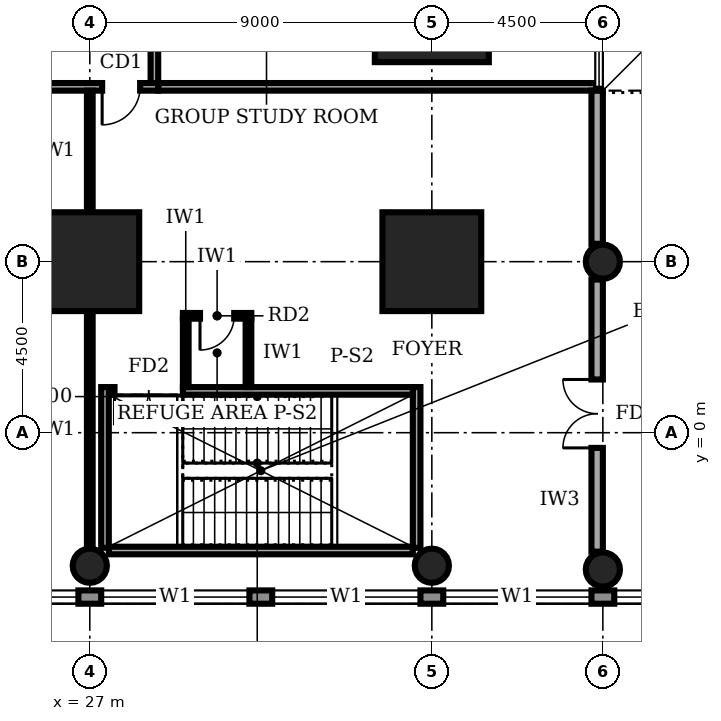
"""IFC4 building model, lengths in metres.
Left out: names, types, materials, properties, quantities, classifications, styles, units other than length and angle.
Written with IfcOpenShell. Run it as: python <this file> out.ifc"""

import sys

from ifc_helpers import new_model, si_unit, direction, frame, frame_2d, origin, origin_2d, place, context, subcontext, project, spatial, rectangle, circle, extrude, element, fill, save


model = new_model("IFC4")
c1 = context("Model", 3, precision=1e-05, world=origin(), true_north=direction((0.0, 1.0)))
c2 = subcontext(c1, "Body", "Model", "MODEL_VIEW")
j1 = project(units=[si_unit("LENGTHUNIT", "METRE"), si_unit("PLANEANGLEUNIT", "RADIAN")], contexts=[c1])
p1 = place(None, origin())
s1 = spatial("IfcSite", under=j1, at=p1, CompositionType="ELEMENT")
p2 = place(p1, origin())
s2 = spatial("IfcBuilding", under=s1, at=p2, CompositionType="ELEMENT")
p3 = place(p2, frame((0.0, 0.0, 11.0)))
s3 = spatial("IfcBuildingStorey", under=s2, at=p3, CompositionType="ELEMENT", Elevation=11.0)
for number, where, z_axis, x_axis in (
    (1, (27.0, 4.5, 0.0), (0.0, 0.0, 1.0), (1.0, 0.0, 0.0)),
    (2, (36.0, 4.5, 0.0), (0.0, 0.0, 1.0), (1.0, 0.0, 0.0)),
):
    element("IfcColumn", number, at=place(p3, frame(where, z_axis=z_axis, x_axis=x_axis)), inside=s3, PredefinedType="COLUMN", context=c2, shape_type="SweptSolid", body=[
        extrude(rectangle(XDim=2.6, YDim=2.6, at=origin_2d()), origin(), (0.0, 0.0, 1.0), 5.0),
    ])
p4 = place(p3, frame((36.0, 11.25, 0.0), z_axis=(0.0, 0.0, 1.0), x_axis=(1.0, 0.0, 0.0)))
e3 = element("IfcColumn", 3, at=p4, inside=s3, PredefinedType="COLUMN", context=c2, shape_type="SweptSolid", body=[
    extrude(rectangle(XDim=3.0, YDim=3.0, at=origin_2d()), origin(), (0.0, 0.0, 1.0), 5.0),
])
for number, where, z_axis, x_axis in (
    (4, (27.0, -3.5, 0.0), (0.0, 0.0, 1.0), (1.0, 0.0, 0.0)),
    (5, (36.0, -3.5, 0.0), (0.0, 0.0, 1.0), (1.0, 0.0, 0.0)),
    (6, (40.5, -3.6, 0.0), (0.0, 0.0, 1.0), (1.0, 0.0, 0.0)),
    (7, (40.5, 4.5, 0.0), (0.0, 0.0, 1.0), (1.0, 0.0, 0.0)),
):
    element("IfcColumn", number, at=place(p3, frame(where, z_axis=z_axis, x_axis=x_axis)), inside=s3, PredefinedType="COLUMN", context=c2, shape_type="SweptSolid", body=[
        extrude(circle(Radius=0.45, at=origin_2d()), origin(), (0.0, 0.0, 1.0), 5.0),
    ])
p5 = place(p3, frame((0.02, -4.325, 0.0), z_axis=(0.0, 0.0, 1.0), x_axis=(1.0, 0.0, 0.0)))
e8 = element("IfcWall", 8, at=p5, inside=s3, PredefinedType="STANDARD", context=c2, shape_type="SweptSolid", body=[
    extrude(rectangle(XDim=98.96, YDim=0.35, at=frame_2d((49.48, 0.0))), origin(), (0.0, 0.0, 1.0), 4.7),
])
p6 = place(p5, frame((4.78, 0.0, 0.9)))
e9 = element("IfcOpeningElement", 9, at=p6, cuts=e8, PredefinedType="OPENING", context=c2, shape_type="SweptSolid", body=[
    extrude(rectangle(XDim=3.9, YDim=2.2, at=frame_2d((1.95, 1.1))), frame((0.0, 0.185, 0.0), z_axis=(0.0, -1.0, 0.0), x_axis=(1.0, 0.0, 0.0)), (0.0, 0.0, 1.0), 0.37),
])
p7 = place(p5, frame((9.28, 0.0, 0.9)))
e10 = element("IfcOpeningElement", 10, at=p7, cuts=e8, PredefinedType="OPENING", context=c2, shape_type="SweptSolid", body=[
    extrude(rectangle(XDim=3.9, YDim=2.2, at=frame_2d((1.95, 1.1))), frame((0.0, 0.185, 0.0), z_axis=(0.0, -1.0, 0.0), x_axis=(1.0, 0.0, 0.0)), (0.0, 0.0, 1.0), 0.37),
])
p8 = place(p5, frame((13.78, 0.0, 0.9)))
e11 = element("IfcOpeningElement", 11, at=p8, cuts=e8, PredefinedType="OPENING", context=c2, shape_type="SweptSolid", body=[
    extrude(rectangle(XDim=3.9, YDim=2.2, at=frame_2d((1.95, 1.1))), frame((0.0, 0.185, 0.0), z_axis=(0.0, -1.0, 0.0), x_axis=(1.0, 0.0, 0.0)), (0.0, 0.0, 1.0), 0.37),
])
p9 = place(p5, frame((18.28, 0.0, 0.9)))
e12 = element("IfcOpeningElement", 12, at=p9, cuts=e8, PredefinedType="OPENING", context=c2, shape_type="SweptSolid", body=[
    extrude(rectangle(XDim=3.9, YDim=2.2, at=frame_2d((1.95, 1.1))), frame((0.0, 0.185, 0.0), z_axis=(0.0, -1.0, 0.0), x_axis=(1.0, 0.0, 0.0)), (0.0, 0.0, 1.0), 0.37),
])
p10 = place(p5, frame((22.78, 0.0, 0.9)))
e13 = element("IfcOpeningElement", 13, at=p10, cuts=e8, PredefinedType="OPENING", context=c2, shape_type="SweptSolid", body=[
    extrude(rectangle(XDim=3.9, YDim=2.2, at=frame_2d((1.95, 1.1))), frame((0.0, 0.185, 0.0), z_axis=(0.0, -1.0, 0.0), x_axis=(1.0, 0.0, 0.0)), (0.0, 0.0, 1.0), 0.37),
])
p11 = place(p5, frame((27.28, 0.0, 0.9)))
e14 = element("IfcOpeningElement", 14, at=p11, cuts=e8, PredefinedType="OPENING", context=c2, shape_type="SweptSolid", body=[
    extrude(rectangle(XDim=3.9, YDim=2.2, at=frame_2d((1.95, 1.1))), frame((0.0, 0.185, 0.0), z_axis=(0.0, -1.0, 0.0), x_axis=(1.0, 0.0, 0.0)), (0.0, 0.0, 1.0), 0.37),
])
p12 = place(p5, frame((31.78, 0.0, 0.9)))
e15 = element("IfcOpeningElement", 15, at=p12, cuts=e8, PredefinedType="OPENING", context=c2, shape_type="SweptSolid", body=[
    extrude(rectangle(XDim=3.9, YDim=2.2, at=frame_2d((1.95, 1.1))), frame((0.0, 0.185, 0.0), z_axis=(0.0, -1.0, 0.0), x_axis=(1.0, 0.0, 0.0)), (0.0, 0.0, 1.0), 0.37),
])
p13 = place(p5, frame((36.28, 0.0, 0.9)))
e16 = element("IfcOpeningElement", 16, at=p13, cuts=e8, PredefinedType="OPENING", context=c2, shape_type="SweptSolid", body=[
    extrude(rectangle(XDim=3.9, YDim=2.2, at=frame_2d((1.95, 1.1))), frame((0.0, 0.185, 0.0), z_axis=(0.0, -1.0, 0.0), x_axis=(1.0, 0.0, 0.0)), (0.0, 0.0, 1.0), 0.37),
])
p14 = place(p5, frame((40.78, 0.0, 0.9)))
e17 = element("IfcOpeningElement", 17, at=p14, cuts=e8, PredefinedType="OPENING", context=c2, shape_type="SweptSolid", body=[
    extrude(rectangle(XDim=3.9, YDim=2.2, at=frame_2d((1.95, 1.1))), frame((0.0, 0.185, 0.0), z_axis=(0.0, -1.0, 0.0), x_axis=(1.0, 0.0, 0.0)), (0.0, 0.0, 1.0), 0.37),
])
p15 = place(p5, frame((45.28, 0.0, 0.9)))
e18 = element("IfcOpeningElement", 18, at=p15, cuts=e8, PredefinedType="OPENING", context=c2, shape_type="SweptSolid", body=[
    extrude(rectangle(XDim=3.9, YDim=2.2, at=frame_2d((1.95, 1.1))), frame((0.0, 0.185, 0.0), z_axis=(0.0, -1.0, 0.0), x_axis=(1.0, 0.0, 0.0)), (0.0, 0.0, 1.0), 0.37),
])
p16 = place(p5, frame((49.78, 0.0, 0.9)))
e19 = element("IfcOpeningElement", 19, at=p16, cuts=e8, PredefinedType="OPENING", context=c2, shape_type="SweptSolid", body=[
    extrude(rectangle(XDim=3.9, YDim=2.2, at=frame_2d((1.95, 1.1))), frame((0.0, 0.185, 0.0), z_axis=(0.0, -1.0, 0.0), x_axis=(1.0, 0.0, 0.0)), (0.0, 0.0, 1.0), 0.37),
])
p17 = place(p5, frame((54.28, 0.0, 0.9)))
e20 = element("IfcOpeningElement", 20, at=p17, cuts=e8, PredefinedType="OPENING", context=c2, shape_type="SweptSolid", body=[
    extrude(rectangle(XDim=3.9, YDim=2.2, at=frame_2d((1.95, 1.1))), frame((0.0, 0.185, 0.0), z_axis=(0.0, -1.0, 0.0), x_axis=(1.0, 0.0, 0.0)), (0.0, 0.0, 1.0), 0.37),
])
p18 = place(p5, frame((58.78, 0.0, 0.9)))
e21 = element("IfcOpeningElement", 21, at=p18, cuts=e8, PredefinedType="OPENING", context=c2, shape_type="SweptSolid", body=[
    extrude(rectangle(XDim=3.9, YDim=2.2, at=frame_2d((1.95, 1.1))), frame((0.0, 0.185, 0.0), z_axis=(0.0, -1.0, 0.0), x_axis=(1.0, 0.0, 0.0)), (0.0, 0.0, 1.0), 0.37),
])
p19 = place(p5, frame((63.28, 0.0, 0.9)))
e22 = element("IfcOpeningElement", 22, at=p19, cuts=e8, PredefinedType="OPENING", context=c2, shape_type="SweptSolid", body=[
    extrude(rectangle(XDim=3.9, YDim=2.2, at=frame_2d((1.95, 1.1))), frame((0.0, 0.185, 0.0), z_axis=(0.0, -1.0, 0.0), x_axis=(1.0, 0.0, 0.0)), (0.0, 0.0, 1.0), 0.37),
])
p20 = place(p5, frame((67.78, 0.0, 0.9)))
e23 = element("IfcOpeningElement", 23, at=p20, cuts=e8, PredefinedType="OPENING", context=c2, shape_type="SweptSolid", body=[
    extrude(rectangle(XDim=3.9, YDim=2.2, at=frame_2d((1.95, 1.1))), frame((0.0, 0.185, 0.0), z_axis=(0.0, -1.0, 0.0), x_axis=(1.0, 0.0, 0.0)), (0.0, 0.0, 1.0), 0.37),
])
p21 = place(p5, frame((72.28, 0.0, 0.9)))
e24 = element("IfcOpeningElement", 24, at=p21, cuts=e8, PredefinedType="OPENING", context=c2, shape_type="SweptSolid", body=[
    extrude(rectangle(XDim=3.9, YDim=2.2, at=frame_2d((1.95, 1.1))), frame((0.0, 0.185, 0.0), z_axis=(0.0, -1.0, 0.0), x_axis=(1.0, 0.0, 0.0)), (0.0, 0.0, 1.0), 0.37),
])
p22 = place(p5, frame((76.78, 0.0, 0.9)))
e25 = element("IfcOpeningElement", 25, at=p22, cuts=e8, PredefinedType="OPENING", context=c2, shape_type="SweptSolid", body=[
    extrude(rectangle(XDim=3.9, YDim=2.2, at=frame_2d((1.95, 1.1))), frame((0.0, 0.185, 0.0), z_axis=(0.0, -1.0, 0.0), x_axis=(1.0, 0.0, 0.0)), (0.0, 0.0, 1.0), 0.37),
])
p23 = place(p5, frame((81.28, 0.0, 0.9)))
e26 = element("IfcOpeningElement", 26, at=p23, cuts=e8, PredefinedType="OPENING", context=c2, shape_type="SweptSolid", body=[
    extrude(rectangle(XDim=3.9, YDim=2.2, at=frame_2d((1.95, 1.1))), frame((0.0, 0.185, 0.0), z_axis=(0.0, -1.0, 0.0), x_axis=(1.0, 0.0, 0.0)), (0.0, 0.0, 1.0), 0.37),
])
p24 = place(p5, frame((85.78, 0.0, 0.9)))
e27 = element("IfcOpeningElement", 27, at=p24, cuts=e8, PredefinedType="OPENING", context=c2, shape_type="SweptSolid", body=[
    extrude(rectangle(XDim=3.9, YDim=2.2, at=frame_2d((1.95, 1.1))), frame((0.0, 0.185, 0.0), z_axis=(0.0, -1.0, 0.0), x_axis=(1.0, 0.0, 0.0)), (0.0, 0.0, 1.0), 0.37),
])
p25 = place(p5, frame((90.28, 0.0, 0.9)))
e28 = element("IfcOpeningElement", 28, at=p25, cuts=e8, PredefinedType="OPENING", context=c2, shape_type="SweptSolid", body=[
    extrude(rectangle(XDim=3.9, YDim=2.2, at=frame_2d((1.95, 1.1))), frame((0.0, 0.185, 0.0), z_axis=(0.0, -1.0, 0.0), x_axis=(1.0, 0.0, 0.0)), (0.0, 0.0, 1.0), 0.37),
])
p26 = place(p5, frame((94.71, 0.0, 0.9)))
e29 = element("IfcOpeningElement", 29, at=p26, cuts=e8, PredefinedType="OPENING", context=c2, shape_type="SweptSolid", body=[
    extrude(rectangle(XDim=3.9, YDim=2.2, at=frame_2d((1.95, 1.1))), frame((0.0, 0.185, 0.0), z_axis=(0.0, -1.0, 0.0), x_axis=(1.0, 0.0, 0.0)), (0.0, 0.0, 1.0), 0.37),
])
p27 = place(p3, frame((11.9, 9.1, 0.0), z_axis=(0.0, 0.0, 1.0), x_axis=(1.0, 0.0, 0.0)))
e30 = element("IfcWall", 30, at=p27, inside=s3, PredefinedType="SOLIDWALL", context=c2, shape_type="SweptSolid", body=[
    extrude(rectangle(XDim=16.9, YDim=0.2, at=frame_2d((8.45, 0.0))), origin(), (0.0, 0.0, 1.0), 4.7),
])
p28 = place(p27, frame((2.05, 0.0, 0.0)))
e31 = element("IfcOpeningElement", 31, at=p28, cuts=e30, PredefinedType="OPENING", context=c2, shape_type="SweptSolid", body=[
    extrude(rectangle(XDim=1.8, YDim=2.1, at=frame_2d((0.9, 1.05))), frame((0.0, 0.11, 0.0), z_axis=(0.0, -1.0, 0.0), x_axis=(1.0, 0.0, 0.0)), (0.0, 0.0, 1.0), 0.22),
])
p29 = place(p27, frame((9.7, 0.0, 0.0)))
e32 = element("IfcOpeningElement", 32, at=p29, cuts=e30, PredefinedType="OPENING", context=c2, shape_type="SweptSolid", body=[
    extrude(rectangle(XDim=1.8, YDim=2.1, at=frame_2d((0.9, 1.05))), frame((0.0, 0.11, 0.0), z_axis=(0.0, -1.0, 0.0), x_axis=(1.0, 0.0, 0.0)), (0.0, 0.0, 1.0), 0.22),
])
p30 = place(p27, frame((15.425, 0.0, 0.0)))
e33 = element("IfcOpeningElement", 33, at=p30, cuts=e30, PredefinedType="OPENING", context=c2, shape_type="SweptSolid", body=[
    extrude(rectangle(XDim=1.0, YDim=2.1, at=frame_2d((0.5, 1.05))), frame((0.0, 0.11, 0.0), z_axis=(0.0, -1.0, 0.0), x_axis=(1.0, 0.0, 0.0)), (0.0, 0.0, 1.0), 0.22),
])
p31 = place(p3, frame((28.7, 9.2, 0.0), z_axis=(0.0, 0.0, 1.0), x_axis=(0.0, 1.0, 0.0)))
e34 = element("IfcWall", 34, at=p31, inside=s3, PredefinedType="SOLIDWALL", context=c2, shape_type="SweptSolid", body=[
    extrude(rectangle(XDim=22.3, YDim=0.2, at=frame_2d((11.15, 0.0))), origin(), (0.0, 0.0, 1.0), 4.7),
])
p32 = place(p31, frame((1.55, 0.0, 0.0)))
e35 = element("IfcOpeningElement", 35, at=p32, cuts=e34, PredefinedType="OPENING", context=c2, shape_type="SweptSolid", body=[
    extrude(rectangle(XDim=1.0, YDim=2.1, at=frame_2d((0.5, 1.05))), frame((0.0, 0.11, 0.0), z_axis=(0.0, -1.0, 0.0), x_axis=(1.0, 0.0, 0.0)), (0.0, 0.0, 1.0), 0.22),
])
p33 = place(p31, frame((6.05, 0.0, 0.0)))
e36 = element("IfcOpeningElement", 36, at=p33, cuts=e34, PredefinedType="OPENING", context=c2, shape_type="SweptSolid", body=[
    extrude(rectangle(XDim=1.0, YDim=2.1, at=frame_2d((0.5, 1.05))), frame((0.0, 0.11, 0.0), z_axis=(0.0, -1.0, 0.0), x_axis=(1.0, 0.0, 0.0)), (0.0, 0.0, 1.0), 0.22),
])
p34 = place(p31, frame((12.4, 0.0, 0.0)))
e37 = element("IfcOpeningElement", 37, at=p34, cuts=e34, PredefinedType="OPENING", context=c2, shape_type="SweptSolid", body=[
    extrude(rectangle(XDim=1.8, YDim=2.1, at=frame_2d((0.9, 1.05))), frame((0.0, 0.11, 0.0), z_axis=(0.0, -1.0, 0.0), x_axis=(1.0, 0.0, 0.0)), (0.0, 0.0, 1.0), 0.22),
])
p35 = place(p31, frame((19.55, 0.0, 0.0)))
e38 = element("IfcOpeningElement", 38, at=p35, cuts=e34, PredefinedType="OPENING", context=c2, shape_type="SweptSolid", body=[
    extrude(rectangle(XDim=1.0, YDim=2.1, at=frame_2d((0.5, 1.05))), frame((0.0, 0.11, 0.0), z_axis=(0.0, -1.0, 0.0), x_axis=(1.0, 0.0, 0.0)), (0.0, 0.0, 1.0), 0.22),
])
p36 = place(p3, frame((28.8, 9.1, 0.0), z_axis=(0.0, 0.0, 1.0), x_axis=(1.0, 0.0, 0.0)))
e39 = element("IfcWall", 39, at=p36, inside=s3, PredefinedType="SOLIDWALL", context=c2, shape_type="SweptSolid", body=[
    extrude(rectangle(XDim=11.52, YDim=0.2, at=frame_2d((5.76, 0.0))), origin(), (0.0, 0.0, 1.0), 4.7),
])
p37 = place(p3, frame((27.0, -3.03, 0.0), z_axis=(0.0, 0.0, 1.0), x_axis=(0.0, 1.0, 0.0)))
e40 = element("IfcWall", 40, at=p37, inside=s3, PredefinedType="PARTITIONING", context=c2, shape_type="SweptSolid", body=[
    extrude(rectangle(XDim=6.21, YDim=0.15, at=frame_2d((3.105, 0.0))), origin(), (0.0, 0.0, 1.0), 3.7),
])
p38 = place(p3, frame((27.0, 5.82, 0.0), z_axis=(0.0, 0.0, 1.0), x_axis=(0.0, 1.0, 0.0)))
e41 = element("IfcWall", 41, at=p38, inside=s3, PredefinedType="PARTITIONING", context=c2, shape_type="SweptSolid", body=[
    extrude(rectangle(XDim=3.18, YDim=0.15, at=frame_2d((1.59, 0.0))), origin(), (0.0, 0.0, 1.0), 3.8),
])
p39 = place(p3, frame((27.5, 1.1, 0.0), z_axis=(0.0, 0.0, 1.0), x_axis=(1.0, 0.0, 0.0)))
e42 = element("IfcWall", 42, at=p39, inside=s3, PredefinedType="SOLIDWALL", context=c2, shape_type="SweptSolid", body=[
    extrude(rectangle(XDim=8.0, YDim=0.2, at=frame_2d((4.0, 0.0))), origin(), (0.0, 0.0, 1.0), 4.7),
])
p40 = place(p39, frame((0.15, 0.0, 0.0)))
e43 = element("IfcOpeningElement", 43, at=p40, cuts=e42, PredefinedType="OPENING", context=c2, shape_type="SweptSolid", body=[
    extrude(rectangle(XDim=1.8, YDim=2.1, at=frame_2d((0.9, 1.05))), frame((0.0, 0.11, 0.0), z_axis=(0.0, -1.0, 0.0), x_axis=(1.0, 0.0, 0.0)), (0.0, 0.0, 1.0), 0.22),
])
p41 = place(p3, frame((27.5, -3.1, 0.0), z_axis=(0.0, 0.0, 1.0), x_axis=(1.0, 0.0, 0.0)))
e44 = element("IfcWall", 44, at=p41, inside=s3, PredefinedType="SOLIDWALL", context=c2, shape_type="SweptSolid", body=[
    extrude(rectangle(XDim=8.0, YDim=0.2, at=frame_2d((4.0, 0.0))), origin(), (0.0, 0.0, 1.0), 4.7),
])
for number, where, z_axis, x_axis in (
    (45, (27.4, -3.03, 0.0), (0.0, 0.0, 1.0), (0.0, 1.0, 0.0)),
    (46, (35.6, -3.03, 0.0), (0.0, 0.0, 1.0), (0.0, 1.0, 0.0)),
):
    element("IfcWall", number, at=place(p3, frame(where, z_axis=z_axis, x_axis=x_axis)), inside=s3, PredefinedType="SOLIDWALL", context=c2, shape_type="SweptSolid", body=[
        extrude(rectangle(XDim=4.23, YDim=0.2, at=frame_2d((2.115, 0.0))), origin(), (0.0, 0.0, 1.0), 4.7),
    ])
p42 = place(p3, frame((40.35, -3.13, 0.0), z_axis=(0.0, 0.0, 1.0), x_axis=(0.0, 1.0, 0.0)))
e47 = element("IfcWall", 47, at=p42, inside=s3, PredefinedType="SOLIDWALL", context=c2, shape_type="SweptSolid", body=[
    extrude(rectangle(XDim=7.16, YDim=0.3, at=frame_2d((3.58, 0.0))), origin(), (0.0, 0.0, 1.0), 3.7),
])
p43 = place(p42, frame((2.73, 0.0, 0.0)))
e48 = element("IfcOpeningElement", 48, at=p43, cuts=e47, PredefinedType="OPENING", context=c2, shape_type="SweptSolid", body=[
    extrude(rectangle(XDim=1.8, YDim=2.1, at=frame_2d((0.9, 1.05))), frame((0.0, 0.16, 0.0), z_axis=(0.0, -1.0, 0.0), x_axis=(1.0, 0.0, 0.0)), (0.0, 0.0, 1.0), 0.32),
])
p44 = place(p3, frame((40.35, 4.97, 0.0), z_axis=(0.0, 0.0, 1.0), x_axis=(0.0, 1.0, 0.0)))
e49 = element("IfcWall", 49, at=p44, inside=s3, PredefinedType="SOLIDWALL", context=c2, shape_type="SweptSolid", body=[
    extrude(rectangle(XDim=4.03, YDim=0.3, at=frame_2d((2.015, 0.0))), origin(), (0.0, 0.0, 1.0), 4.7),
])
p45 = place(p3, frame((31.175, 1.2, 0.0), z_axis=(0.0, 0.0, 1.0), x_axis=(0.0, 1.0, 0.0)))
e50 = element("IfcWall", 50, at=p45, inside=s3, PredefinedType="PARTITIONING", context=c2, shape_type="SweptSolid", body=[
    extrude(rectangle(XDim=1.8, YDim=0.15, at=frame_2d((0.9, 0.0))), origin(), (0.0, 0.0, 1.0), 4.7),
])
p46 = place(p3, frame((29.45, 3.075, 0.0), z_axis=(0.0, 0.0, 1.0), x_axis=(1.0, 0.0, 0.0)))
e51 = element("IfcWall", 51, at=p46, inside=s3, PredefinedType="PARTITIONING", context=c2, shape_type="SweptSolid", body=[
    extrude(rectangle(XDim=1.8, YDim=0.15, at=frame_2d((0.9, 0.0))), origin(), (0.0, 0.0, 1.0), 4.7),
])
p47 = place(p46, frame((0.45, 0.0, 0.0)))
e52 = element("IfcOpeningElement", 52, at=p47, cuts=e51, PredefinedType="OPENING", context=c2, shape_type="SweptSolid", body=[
    extrude(rectangle(XDim=0.9, YDim=2.1, at=frame_2d((0.45, 1.05))), frame((0.0, 0.085, 0.0), z_axis=(0.0, -1.0, 0.0), x_axis=(1.0, 0.0, 0.0)), (0.0, 0.0, 1.0), 0.17),
])
p48 = place(p3, frame((29.525, 1.2, 0.0), z_axis=(0.0, 0.0, 1.0), x_axis=(0.0, 1.0, 0.0)))
e53 = element("IfcWall", 53, at=p48, inside=s3, PredefinedType="PARTITIONING", context=c2, shape_type="SweptSolid", body=[
    extrude(rectangle(XDim=1.8, YDim=0.15, at=frame_2d((0.9, 0.0))), origin(), (0.0, 0.0, 1.0), 4.7),
])
p49 = place(p10, origin())
e54 = element("IfcWindow", 54, at=p49, inside=s3, PartitioningType="SINGLE_PANEL", PredefinedType="WINDOW", context=c2, shape_type="SweptSolid", body=[
    extrude(rectangle(XDim=3.9, YDim=2.2, at=frame_2d((1.95, 1.1))), frame((0.0, 0.03, 0.0), z_axis=(0.0, -1.0, 0.0), x_axis=(1.0, 0.0, 0.0)), (0.0, 0.0, 1.0), 0.06),
])
fill(e13, e54)
p50 = place(p11, origin())
e55 = element("IfcWindow", 55, at=p50, inside=s3, PartitioningType="SINGLE_PANEL", PredefinedType="WINDOW", context=c2, shape_type="SweptSolid", body=[
    extrude(rectangle(XDim=3.9, YDim=2.2, at=frame_2d((1.95, 1.1))), frame((0.0, 0.03, 0.0), z_axis=(0.0, -1.0, 0.0), x_axis=(1.0, 0.0, 0.0)), (0.0, 0.0, 1.0), 0.06),
])
fill(e14, e55)
p51 = place(p12, origin())
e56 = element("IfcWindow", 56, at=p51, inside=s3, PartitioningType="SINGLE_PANEL", PredefinedType="WINDOW", context=c2, shape_type="SweptSolid", body=[
    extrude(rectangle(XDim=3.9, YDim=2.2, at=frame_2d((1.95, 1.1))), frame((0.0, 0.03, 0.0), z_axis=(0.0, -1.0, 0.0), x_axis=(1.0, 0.0, 0.0)), (0.0, 0.0, 1.0), 0.06),
])
fill(e15, e56)
p52 = place(p13, origin())
e57 = element("IfcWindow", 57, at=p52, inside=s3, PartitioningType="SINGLE_PANEL", PredefinedType="WINDOW", context=c2, shape_type="SweptSolid", body=[
    extrude(rectangle(XDim=3.9, YDim=2.2, at=frame_2d((1.95, 1.1))), frame((0.0, 0.03, 0.0), z_axis=(0.0, -1.0, 0.0), x_axis=(1.0, 0.0, 0.0)), (0.0, 0.0, 1.0), 0.06),
])
fill(e16, e57)
p53 = place(p14, origin())
e58 = element("IfcWindow", 58, at=p53, inside=s3, PartitioningType="SINGLE_PANEL", PredefinedType="WINDOW", context=c2, shape_type="SweptSolid", body=[
    extrude(rectangle(XDim=3.9, YDim=2.2, at=frame_2d((1.95, 1.1))), frame((0.0, 0.03, 0.0), z_axis=(0.0, -1.0, 0.0), x_axis=(1.0, 0.0, 0.0)), (0.0, 0.0, 1.0), 0.06),
])
fill(e17, e58)
p54 = place(p30, frame((1.0, 0.0, 0.0), z_axis=(0.0, 0.0, 1.0), x_axis=(-1.0, 0.0, 0.0)))
e59 = element("IfcDoor", 59, at=p54, inside=s3, OperationType="SINGLE_SWING_RIGHT", PredefinedType="DOOR", context=c2, shape_type="SweptSolid", body=[
    extrude(rectangle(XDim=1.0, YDim=2.1, at=frame_2d((0.5, 1.05))), frame((0.0, 0.025, 0.0), z_axis=(0.0, -1.0, 0.0), x_axis=(1.0, 0.0, 0.0)), (0.0, 0.0, 1.0), 0.05),
])
fill(e33, e59)
p55 = place(p40, frame((1.8, 0.0, 0.0), z_axis=(0.0, 0.0, 1.0), x_axis=(-1.0, 0.0, 0.0)))
e60 = element("IfcDoor", 60, at=p55, inside=s3, OperationType="DOUBLE_DOOR_SINGLE_SWING", PredefinedType="DOOR", context=c2, shape_type="SweptSolid", body=[
    extrude(rectangle(XDim=1.8, YDim=2.1, at=frame_2d((0.9, 1.05))), frame((0.0, 0.025, 0.0), z_axis=(0.0, -1.0, 0.0), x_axis=(1.0, 0.0, 0.0)), (0.0, 0.0, 1.0), 0.05),
])
fill(e43, e60)
p56 = place(p43, origin())
e61 = element("IfcDoor", 61, at=p56, inside=s3, OperationType="DOUBLE_DOOR_SINGLE_SWING", PredefinedType="DOOR", context=c2, shape_type="SweptSolid", body=[
    extrude(rectangle(XDim=1.8, YDim=2.1, at=frame_2d((0.9, 1.05))), frame((0.0, 0.025, 0.0), z_axis=(0.0, -1.0, 0.0), x_axis=(1.0, 0.0, 0.0)), (0.0, 0.0, 1.0), 0.05),
])
fill(e48, e61)
p57 = place(p47, frame((0.9, 0.0, 0.0), z_axis=(0.0, 0.0, 1.0), x_axis=(-1.0, 0.0, 0.0)))
e62 = element("IfcDoor", 62, at=p57, inside=s3, OperationType="SINGLE_SWING_RIGHT", PredefinedType="DOOR", context=c2, shape_type="SweptSolid", body=[
    extrude(rectangle(XDim=0.9, YDim=2.1, at=frame_2d((0.45, 1.05))), frame((0.0, 0.025, 0.0), z_axis=(0.0, -1.0, 0.0), x_axis=(1.0, 0.0, 0.0)), (0.0, 0.0, 1.0), 0.05),
])
fill(e52, e62)
save(model, sys.argv[1])
